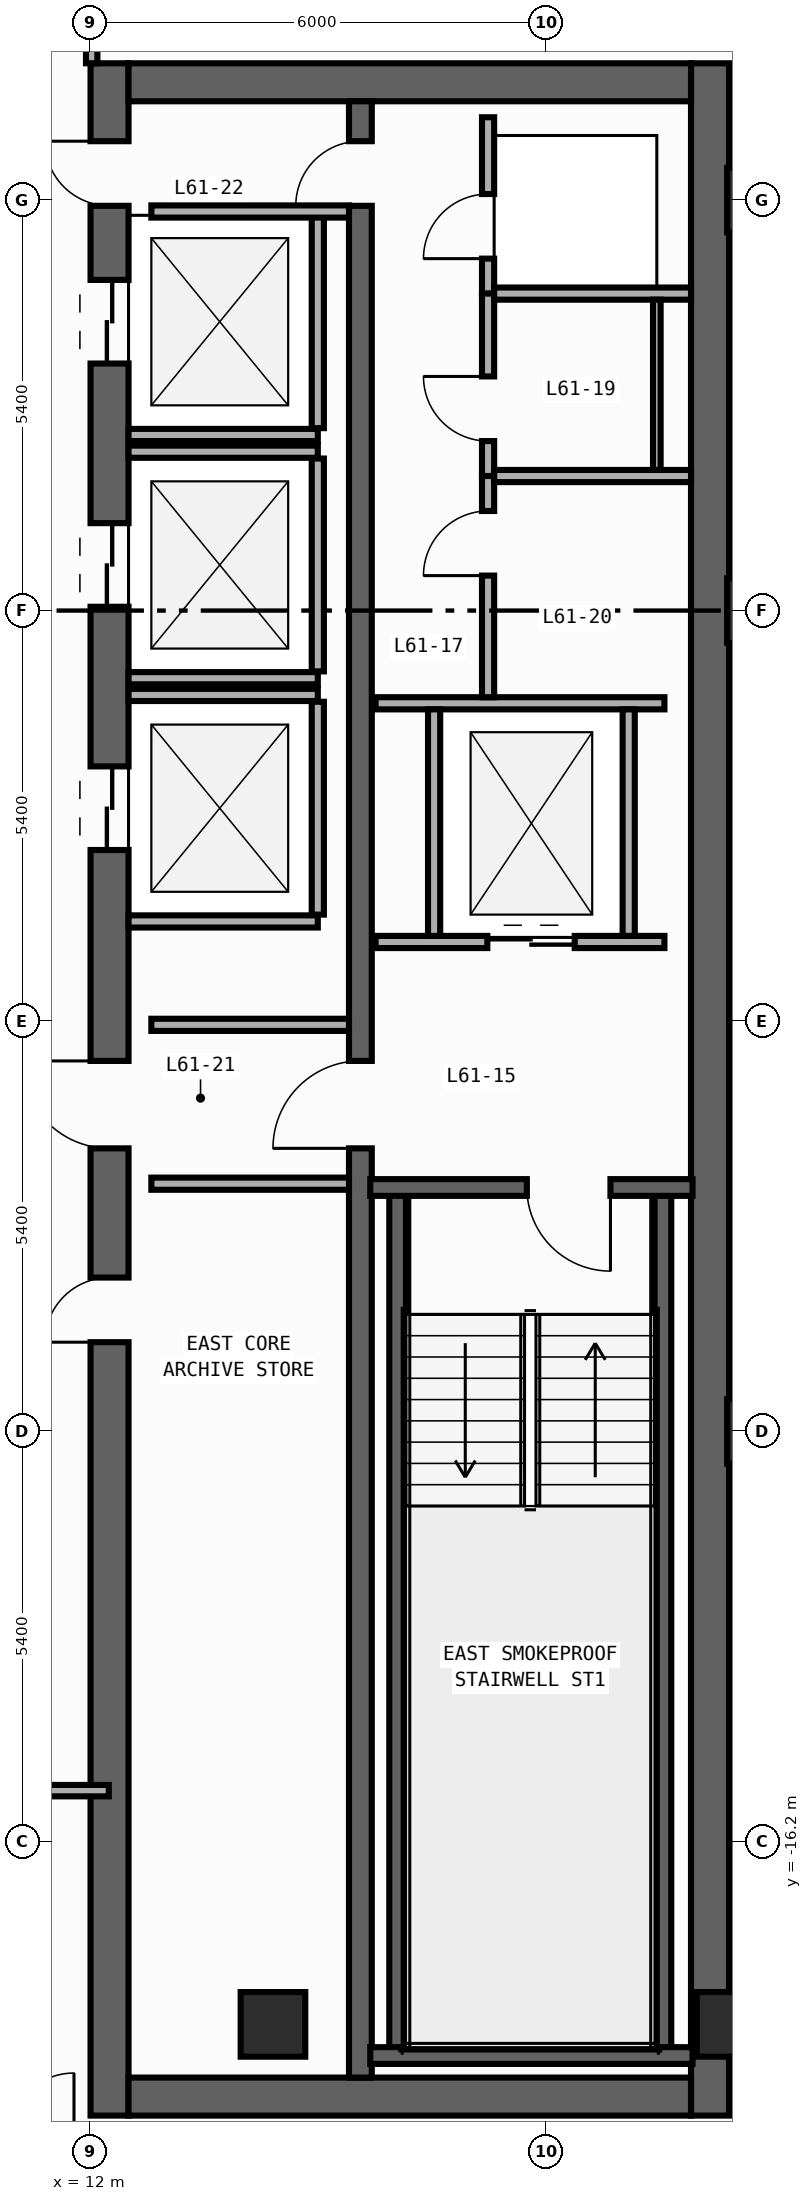
"""IFC4 building model, lengths in metres.
Left out: names, types, materials, properties, quantities, classifications, styles, units other than length and angle.
Written with IfcOpenShell. Run it as: python <this file> out.ifc"""

import sys

from ifc_helpers import new_model, si_unit, direction, frame, frame_2d, origin, origin_2d, place, context, subcontext, project, spatial, rectangle, extrude, element, fill, save


model = new_model("IFC4")
c1 = context("Model", 3, precision=1e-05, world=origin(), true_north=direction((0.0, 1.0)))
c2 = subcontext(c1, "Body", "Model", "MODEL_VIEW")
j1 = project(units=[si_unit("LENGTHUNIT", "METRE"), si_unit("PLANEANGLEUNIT", "RADIAN")], contexts=[c1])
p1 = place(None, origin())
s1 = spatial("IfcSite", under=j1, at=p1, CompositionType="ELEMENT")
p2 = place(p1, origin())
s2 = spatial("IfcBuilding", under=s1, at=p2, CompositionType="ELEMENT")
p3 = place(p2, frame((0.0, 0.0, 258.4)))
s3 = spatial("IfcBuildingStorey", under=s2, at=p3, CompositionType="ELEMENT", Elevation=258.4)
p4 = place(p3, frame((12.25, -19.8, 0.0), z_axis=(0.0, 0.0, 1.0), x_axis=(0.0, 1.0, 0.0)))
e1 = element("IfcWall", 1, at=p4, inside=s3, PredefinedType="SHEAR", context=c2, shape_type="SweptSolid", body=[
    extrude(rectangle(XDim=27.0, YDim=0.5, at=frame_2d((13.5, 0.0))), origin(), (0.0, 0.0, 1.0), 3.34),
])
p5 = place(p4, frame((23.05, 0.0, 0.0)))
e2 = element("IfcOpeningElement", 2, at=p5, cuts=e1, PredefinedType="OPENING", context=c2, shape_type="SweptSolid", body=[
    extrude(rectangle(XDim=1.1, YDim=2.2, at=frame_2d((0.55, 1.1))), frame((0.0, 0.26, 0.0), z_axis=(0.0, -1.0, 0.0), x_axis=(1.0, 0.0, 0.0)), (0.0, 0.0, 1.0), 0.52),
])
p6 = place(p4, frame((19.85, 0.0, 0.0)))
e3 = element("IfcOpeningElement", 3, at=p6, cuts=e1, PredefinedType="OPENING", context=c2, shape_type="SweptSolid", body=[
    extrude(rectangle(XDim=1.1, YDim=2.2, at=frame_2d((0.55, 1.1))), frame((0.0, 0.26, 0.0), z_axis=(0.0, -1.0, 0.0), x_axis=(1.0, 0.0, 0.0)), (0.0, 0.0, 1.0), 0.52),
])
p7 = place(p4, frame((16.65, 0.0, 0.0)))
e4 = element("IfcOpeningElement", 4, at=p7, cuts=e1, PredefinedType="OPENING", context=c2, shape_type="SweptSolid", body=[
    extrude(rectangle(XDim=1.1, YDim=2.2, at=frame_2d((0.55, 1.1))), frame((0.0, 0.26, 0.0), z_axis=(0.0, -1.0, 0.0), x_axis=(1.0, 0.0, 0.0)), (0.0, 0.0, 1.0), 0.52),
])
p8 = place(p4, frame((10.175, 0.0, 0.0)))
e5 = element("IfcOpeningElement", 5, at=p8, cuts=e1, PredefinedType="OPENING", context=c2, shape_type="SweptSolid", body=[
    extrude(rectangle(XDim=0.85, YDim=2.1, at=frame_2d((0.425, 1.05))), frame((0.0, 0.26, 0.0), z_axis=(0.0, -1.0, 0.0), x_axis=(1.0, 0.0, 0.0)), (0.0, 0.0, 1.0), 0.52),
])
p9 = place(p4, frame((12.725, 0.0, 0.0)))
e6 = element("IfcOpeningElement", 6, at=p9, cuts=e1, PredefinedType="OPENING", context=c2, shape_type="SweptSolid", body=[
    extrude(rectangle(XDim=1.15, YDim=2.2, at=frame_2d((0.575, 1.1))), frame((0.0, 0.26, 0.0), z_axis=(0.0, -1.0, 0.0), x_axis=(1.0, 0.0, 0.0)), (0.0, 0.0, 1.0), 0.52),
])
p10 = place(p4, frame((25.125, 0.0, 0.0)))
e7 = element("IfcOpeningElement", 7, at=p10, cuts=e1, PredefinedType="OPENING", context=c2, shape_type="SweptSolid", body=[
    extrude(rectangle(XDim=0.85, YDim=2.1, at=frame_2d((0.425, 1.05))), frame((0.0, 0.26, 0.0), z_axis=(0.0, -1.0, 0.0), x_axis=(1.0, 0.0, 0.0)), (0.0, 0.0, 1.0), 0.52),
])
p11 = place(p3, frame((20.15, -19.8, 0.0), z_axis=(0.0, 0.0, 1.0), x_axis=(0.0, 1.0, 0.0)))
e8 = element("IfcWall", 8, at=p11, inside=s3, PredefinedType="SHEAR", context=c2, shape_type="SweptSolid", body=[
    extrude(rectangle(XDim=27.0, YDim=0.5, at=frame_2d((13.5, 0.0))), origin(), (0.0, 0.0, 1.0), 3.34),
])
for number, where, z_axis, x_axis in (
    (9, (12.5, -19.55, 0.0), (0.0, 0.0, 1.0), (1.0, 0.0, 0.0)),
    (10, (12.5, 6.95, 0.0), (0.0, 0.0, 1.0), (1.0, 0.0, 0.0)),
):
    element("IfcWall", number, at=place(p3, frame(where, z_axis=z_axis, x_axis=x_axis)), inside=s3, PredefinedType="SHEAR", context=c2, shape_type="SweptSolid", body=[
        extrude(rectangle(XDim=7.4, YDim=0.5, at=frame_2d((3.7, 0.0))), origin(), (0.0, 0.0, 1.0), 3.34),
    ])
p12 = place(p3, frame((15.55, -19.3, 0.0), z_axis=(0.0, 0.0, 1.0), x_axis=(0.0, 1.0, 0.0)))
e11 = element("IfcWall", 11, at=p12, inside=s3, PredefinedType="SHEAR", context=c2, shape_type="SweptSolid", body=[
    extrude(rectangle(XDim=26.0, YDim=0.3, at=frame_2d((13.0, 0.0))), origin(), (0.0, 0.0, 1.0), 3.34),
])
p13 = place(p12, frame((12.225, 0.0, 0.0)))
e12 = element("IfcOpeningElement", 12, at=p13, cuts=e11, PredefinedType="OPENING", context=c2, shape_type="SweptSolid", body=[
    extrude(rectangle(XDim=1.15, YDim=2.2, at=frame_2d((0.575, 1.1))), frame((0.0, 0.16, 0.0), z_axis=(0.0, -1.0, 0.0), x_axis=(1.0, 0.0, 0.0)), (0.0, 0.0, 1.0), 0.32),
])
p14 = place(p12, frame((24.625, 0.0, 0.0)))
e13 = element("IfcOpeningElement", 13, at=p14, cuts=e11, PredefinedType="OPENING", context=c2, shape_type="SweptSolid", body=[
    extrude(rectangle(XDim=0.85, YDim=2.1, at=frame_2d((0.425, 1.05))), frame((0.0, 0.16, 0.0), z_axis=(0.0, -1.0, 0.0), x_axis=(1.0, 0.0, 0.0)), (0.0, 0.0, 1.0), 0.32),
])
for number, where, z_axis, x_axis in (
    (14, (16.04, -19.01, 0.0), (0.0, 0.0, 1.0), (0.0, 1.0, 0.0)),
    (15, (19.53, -19.01, 0.0), (0.0, 0.0, 1.0), (0.0, 1.0, 0.0)),
):
    element("IfcWall", number, at=place(p3, frame(where, z_axis=z_axis, x_axis=x_axis)), inside=s3, PredefinedType="SHEAR", context=c2, shape_type="SweptSolid", body=[
        extrude(rectangle(XDim=11.42, YDim=0.22, at=frame_2d((5.71, 0.0))), origin(), (0.0, 0.0, 1.0), 3.34),
    ])
p15 = place(p3, frame((15.68, -19.01, 0.0), z_axis=(0.0, 0.0, 1.0), x_axis=(1.0, 0.0, 0.0)))
e16 = element("IfcWall", 16, at=p15, inside=s3, PredefinedType="SHEAR", context=c2, shape_type="SweptSolid", body=[
    extrude(rectangle(XDim=4.24, YDim=0.22, at=frame_2d((2.12, 0.0))), origin(), (0.0, 0.0, 1.0), 3.34),
])
p16 = place(p3, frame((19.92, -7.59, 0.0), z_axis=(0.0, 0.0, 1.0), x_axis=(-1.0, 0.0, 0.0)))
e17 = element("IfcWall", 17, at=p16, inside=s3, PredefinedType="SHEAR", context=c2, shape_type="SweptSolid", body=[
    extrude(rectangle(XDim=4.24, YDim=0.22, at=frame_2d((2.12, 0.0))), origin(), (0.0, 0.0, 1.0), 3.34),
])
p17 = place(p16, frame((1.08, 0.0, 0.0)))
e18 = element("IfcOpeningElement", 18, at=p17, cuts=e17, PredefinedType="OPENING", context=c2, shape_type="SweptSolid", body=[
    extrude(rectangle(XDim=1.1, YDim=2.2, at=frame_2d((0.55, 1.1))), frame((0.0, 0.12, 0.0), z_axis=(0.0, -1.0, 0.0), x_axis=(1.0, 0.0, 0.0)), (0.0, 0.0, 1.0), 0.24),
])
for number, where, z_axis, x_axis in (
    (19, (20.4, -18.6, 0.0), (0.0, 0.0, 1.0), (1.0, 0.0, 0.0)),
    (20, (14.4, -18.6, 0.0), (0.0, 0.0, 1.0), (1.0, 0.0, 0.0)),
    (21, (20.8, -10.8, 0.0), (0.0, 0.0, 1.0), (1.0, 0.0, 0.0)),
    (22, (20.8, 0.0, 0.0), (0.0, 0.0, 1.0), (1.0, 0.0, 0.0)),
    (23, (20.8, 5.4, 0.0), (0.0, 0.0, 1.0), (1.0, 0.0, 0.0)),
):
    element("IfcColumn", number, at=place(p3, frame(where, z_axis=z_axis, x_axis=x_axis)), inside=s3, PredefinedType="COLUMN", context=c2, shape_type="SweptSolid", body=[
        extrude(rectangle(XDim=0.85, YDim=0.85, at=origin_2d()), origin(), (0.0, 0.0, 1.0), 3.6),
    ])
p18 = place(p3, frame((12.5, 2.31, 0.0), z_axis=(0.0, 0.0, 1.0), x_axis=(1.0, 0.0, 0.0)))
e24 = element("IfcWall", 24, at=p18, inside=s3, PredefinedType="STANDARD", context=c2, shape_type="SweptSolid", body=[
    extrude(rectangle(XDim=2.49, YDim=0.16, at=frame_2d((1.245, 0.0))), origin(), (0.0, 0.0, 1.0), 3.34),
])
p19 = place(p3, frame((14.99, 2.4, 0.0), z_axis=(0.0, 0.0, 1.0), x_axis=(0.0, 1.0, 0.0)))
e25 = element("IfcWall", 25, at=p19, inside=s3, PredefinedType="STANDARD", context=c2, shape_type="SweptSolid", body=[
    extrude(rectangle(XDim=2.8, YDim=0.16, at=frame_2d((1.4, 0.0))), origin(), (0.0, 0.0, 1.0), 3.34),
])
for number, where, z_axis, x_axis in (
    (26, (12.5, -0.89, 0.0), (0.0, 0.0, 1.0), (1.0, 0.0, 0.0)),
    (27, (12.5, 2.09, 0.0), (0.0, 0.0, 1.0), (1.0, 0.0, 0.0)),
):
    element("IfcWall", number, at=place(p3, frame(where, z_axis=z_axis, x_axis=x_axis)), inside=s3, PredefinedType="STANDARD", context=c2, shape_type="SweptSolid", body=[
        extrude(rectangle(XDim=2.49, YDim=0.16, at=frame_2d((1.245, 0.0))), origin(), (0.0, 0.0, 1.0), 3.34),
    ])
p20 = place(p3, frame((14.99, -0.8, 0.0), z_axis=(0.0, 0.0, 1.0), x_axis=(0.0, 1.0, 0.0)))
e28 = element("IfcWall", 28, at=p20, inside=s3, PredefinedType="STANDARD", context=c2, shape_type="SweptSolid", body=[
    extrude(rectangle(XDim=2.8, YDim=0.16, at=frame_2d((1.4, 0.0))), origin(), (0.0, 0.0, 1.0), 3.34),
])
for number, where, z_axis, x_axis in (
    (29, (12.5, -4.09, 0.0), (0.0, 0.0, 1.0), (1.0, 0.0, 0.0)),
    (30, (12.5, -1.11, 0.0), (0.0, 0.0, 1.0), (1.0, 0.0, 0.0)),
):
    element("IfcWall", number, at=place(p3, frame(where, z_axis=z_axis, x_axis=x_axis)), inside=s3, PredefinedType="STANDARD", context=c2, shape_type="SweptSolid", body=[
        extrude(rectangle(XDim=2.49, YDim=0.16, at=frame_2d((1.245, 0.0))), origin(), (0.0, 0.0, 1.0), 3.34),
    ])
p21 = place(p3, frame((14.99, -4.0, 0.0), z_axis=(0.0, 0.0, 1.0), x_axis=(0.0, 1.0, 0.0)))
e31 = element("IfcWall", 31, at=p21, inside=s3, PredefinedType="STANDARD", context=c2, shape_type="SweptSolid", body=[
    extrude(rectangle(XDim=2.8, YDim=0.16, at=frame_2d((1.4, 0.0))), origin(), (0.0, 0.0, 1.0), 3.34),
])
p22 = place(p3, frame((15.75, -4.36, 0.0), z_axis=(0.0, 0.0, 1.0), x_axis=(1.0, 0.0, 0.0)))
e32 = element("IfcWall", 32, at=p22, inside=s3, PredefinedType="STANDARD", context=c2, shape_type="SweptSolid", body=[
    extrude(rectangle(XDim=3.8, YDim=0.16, at=frame_2d((1.9, 0.0))), origin(), (0.0, 0.0, 1.0), 3.34),
])
p23 = place(p22, frame((1.47, 0.0, 0.0)))
e33 = element("IfcOpeningElement", 33, at=p23, cuts=e32, PredefinedType="OPENING", context=c2, shape_type="SweptSolid", body=[
    extrude(rectangle(XDim=1.15, YDim=2.2, at=frame_2d((0.575, 1.1))), frame((0.0, 0.09, 0.0), z_axis=(0.0, -1.0, 0.0), x_axis=(1.0, 0.0, 0.0)), (0.0, 0.0, 1.0), 0.18),
])
p24 = place(p3, frame((15.75, -1.22, 0.0), z_axis=(0.0, 0.0, 1.0), x_axis=(1.0, 0.0, 0.0)))
e34 = element("IfcWall", 34, at=p24, inside=s3, PredefinedType="STANDARD", context=c2, shape_type="SweptSolid", body=[
    extrude(rectangle(XDim=3.8, YDim=0.16, at=frame_2d((1.9, 0.0))), origin(), (0.0, 0.0, 1.0), 3.34),
])
for number, where, z_axis, x_axis in (
    (35, (16.52, -4.28, 0.0), (0.0, 0.0, 1.0), (0.0, 1.0, 0.0)),
    (36, (19.08, -4.28, 0.0), (0.0, 0.0, 1.0), (0.0, 1.0, 0.0)),
):
    element("IfcWall", number, at=place(p3, frame(where, z_axis=z_axis, x_axis=x_axis)), inside=s3, PredefinedType="STANDARD", context=c2, shape_type="SweptSolid", body=[
        extrude(rectangle(XDim=2.98, YDim=0.16, at=frame_2d((1.49, 0.0))), origin(), (0.0, 0.0, 1.0), 3.34),
    ])
for number, where, z_axis, x_axis in (
    (37, (12.8, -5.45, 0.0), (0.0, 0.0, 1.0), (1.0, 0.0, 0.0)),
    (38, (12.8, -7.54, 0.0), (0.0, 0.0, 1.0), (1.0, 0.0, 0.0)),
    (39, (12.8, 5.25, 0.0), (0.0, 0.0, 1.0), (1.0, 0.0, 0.0)),
):
    element("IfcWall", number, at=place(p3, frame(where, z_axis=z_axis, x_axis=x_axis)), inside=s3, PredefinedType="STANDARD", context=c2, shape_type="SweptSolid", body=[
        extrude(rectangle(XDim=2.6, YDim=0.16, at=frame_2d((1.3, 0.0))), origin(), (0.0, 0.0, 1.0), 3.34),
    ])
p25 = place(p3, frame((17.23, 4.17, 0.0), z_axis=(0.0, 0.0, 1.0), x_axis=(0.0, 1.0, 0.0)))
e40 = element("IfcWall", 40, at=p25, inside=s3, PredefinedType="PARTITIONING", context=c2, shape_type="SweptSolid", body=[
    extrude(rectangle(XDim=2.32, YDim=0.16, at=frame_2d((1.16, 0.0))), origin(), (0.0, 0.0, 1.0), 3.34),
])
p26 = place(p25, frame((0.46, 0.0, 0.0)))
e41 = element("IfcOpeningElement", 41, at=p26, cuts=e40, PredefinedType="OPENING", context=c2, shape_type="SweptSolid", body=[
    extrude(rectangle(XDim=0.85, YDim=2.1, at=frame_2d((0.425, 1.05))), frame((0.0, 0.09, 0.0), z_axis=(0.0, -1.0, 0.0), x_axis=(1.0, 0.0, 0.0)), (0.0, 0.0, 1.0), 0.18),
])
p27 = place(p3, frame((17.23, 1.77, 0.0), z_axis=(0.0, 0.0, 1.0), x_axis=(0.0, 1.0, 0.0)))
e42 = element("IfcWall", 42, at=p27, inside=s3, PredefinedType="PARTITIONING", context=c2, shape_type="SweptSolid", body=[
    extrude(rectangle(XDim=2.4, YDim=0.16, at=frame_2d((1.2, 0.0))), origin(), (0.0, 0.0, 1.0), 3.34),
])
p28 = place(p27, frame((0.46, 0.0, 0.0)))
e43 = element("IfcOpeningElement", 43, at=p28, cuts=e42, PredefinedType="OPENING", context=c2, shape_type="SweptSolid", body=[
    extrude(rectangle(XDim=0.85, YDim=2.1, at=frame_2d((0.425, 1.05))), frame((0.0, 0.09, 0.0), z_axis=(0.0, -1.0, 0.0), x_axis=(1.0, 0.0, 0.0)), (0.0, 0.0, 1.0), 0.18),
])
p29 = place(p3, frame((17.23, -1.14, 0.0), z_axis=(0.0, 0.0, 1.0), x_axis=(0.0, 1.0, 0.0)))
e44 = element("IfcWall", 44, at=p29, inside=s3, PredefinedType="PARTITIONING", context=c2, shape_type="SweptSolid", body=[
    extrude(rectangle(XDim=2.91, YDim=0.16, at=frame_2d((1.455, 0.0))), origin(), (0.0, 0.0, 1.0), 3.34),
])
p30 = place(p29, frame((1.6, 0.0, 0.0)))
e45 = element("IfcOpeningElement", 45, at=p30, cuts=e44, PredefinedType="OPENING", context=c2, shape_type="SweptSolid", body=[
    extrude(rectangle(XDim=0.85, YDim=2.1, at=frame_2d((0.425, 1.05))), frame((0.0, 0.09, 0.0), z_axis=(0.0, -1.0, 0.0), x_axis=(1.0, 0.0, 0.0)), (0.0, 0.0, 1.0), 0.18),
])
for number, where, z_axis, x_axis in (
    (46, (17.31, 4.17, 0.0), (0.0, 0.0, 1.0), (1.0, 0.0, 0.0)),
    (47, (17.31, 1.77, 0.0), (0.0, 0.0, 1.0), (1.0, 0.0, 0.0)),
):
    element("IfcWall", number, at=place(p3, frame(where, z_axis=z_axis, x_axis=x_axis)), inside=s3, PredefinedType="PARTITIONING", context=c2, shape_type="SweptSolid", body=[
        extrude(rectangle(XDim=2.59, YDim=0.16, at=frame_2d((1.295, 0.0))), origin(), (0.0, 0.0, 1.0), 3.34),
    ])
p31 = place(p3, frame((12.015, 7.2, 0.0), z_axis=(0.0, 0.0, 1.0), x_axis=(0.0, 1.0, 0.0)))
e48 = element("IfcWall", 48, at=p31, inside=s3, PredefinedType="PARTITIONING", context=c2, shape_type="SweptSolid", body=[
    extrude(rectangle(XDim=6.52, YDim=0.15, at=frame_2d((3.26, 0.0))), origin(), (0.0, 0.0, 1.0), 3.34),
])
p32 = place(p31, frame((0.67, 0.0, 0.0)))
e49 = element("IfcOpeningElement", 49, at=p32, cuts=e48, PredefinedType="OPENING", context=c2, shape_type="SweptSolid", body=[
    extrude(rectangle(XDim=0.9, YDim=2.15, at=frame_2d((0.45, 1.075))), frame((0.0, 0.085, 0.0), z_axis=(0.0, -1.0, 0.0), x_axis=(1.0, 0.0, 0.0)), (0.0, 0.0, 1.0), 0.17),
])
p33 = place(p3, frame((2.89, -15.525, 0.0), z_axis=(0.0, 0.0, 1.0), x_axis=(1.0, 0.0, 0.0)))
e50 = element("IfcWall", 50, at=p33, inside=s3, PredefinedType="PARTITIONING", context=c2, shape_type="SweptSolid", body=[
    extrude(rectangle(XDim=9.35, YDim=0.15, at=frame_2d((4.675, 0.0))), origin(), (0.0, 0.0, 1.0), 3.34),
])
p34 = place(p33, frame((3.716, 0.0, 0.0)))
e51 = element("IfcOpeningElement", 51, at=p34, cuts=e50, PredefinedType="OPENING", context=c2, shape_type="SweptSolid", body=[
    extrude(rectangle(XDim=0.9, YDim=2.15, at=frame_2d((0.45, 1.075))), frame((0.0, 0.085, 0.0), z_axis=(0.0, -1.0, 0.0), x_axis=(1.0, 0.0, 0.0)), (0.0, 0.0, 1.0), 0.17),
])
p35 = place(p3, frame((19.45, 4.09, 0.0), z_axis=(0.0, 0.0, 1.0), x_axis=(0.0, -1.0, 0.0)))
e52 = element("IfcWall", 52, at=p35, inside=s3, PredefinedType="PARTITIONING", context=c2, shape_type="SweptSolid", body=[
    extrude(rectangle(XDim=2.24, YDim=0.1, at=frame_2d((1.12, 0.0))), origin(), (0.0, 0.0, 1.0), 3.34),
])
p36 = place(p17, origin())
e53 = element("IfcDoor", 53, at=p36, inside=s3, OperationType="SINGLE_SWING_LEFT", PredefinedType="DOOR", context=c2, shape_type="SweptSolid", body=[
    extrude(rectangle(XDim=1.1, YDim=2.2, at=frame_2d((0.55, 1.1))), frame((0.0, 0.025, 0.0), z_axis=(0.0, -1.0, 0.0), x_axis=(1.0, 0.0, 0.0)), (0.0, 0.0, 1.0), 0.05),
])
fill(e18, e53)
p37 = place(p5, origin())
e54 = element("IfcDoor", 54, at=p37, inside=s3, OperationType="DOUBLE_DOOR_SLIDING", PredefinedType="DOOR", context=c2, shape_type="SweptSolid", body=[
    extrude(rectangle(XDim=1.1, YDim=2.2, at=frame_2d((0.55, 1.1))), frame((0.0, 0.025, 0.0), z_axis=(0.0, -1.0, 0.0), x_axis=(1.0, 0.0, 0.0)), (0.0, 0.0, 1.0), 0.05),
])
fill(e2, e54)
p38 = place(p6, origin())
e55 = element("IfcDoor", 55, at=p38, inside=s3, OperationType="DOUBLE_DOOR_SLIDING", PredefinedType="DOOR", context=c2, shape_type="SweptSolid", body=[
    extrude(rectangle(XDim=1.1, YDim=2.2, at=frame_2d((0.55, 1.1))), frame((0.0, 0.025, 0.0), z_axis=(0.0, -1.0, 0.0), x_axis=(1.0, 0.0, 0.0)), (0.0, 0.0, 1.0), 0.05),
])
fill(e3, e55)
p39 = place(p7, origin())
e56 = element("IfcDoor", 56, at=p39, inside=s3, OperationType="DOUBLE_DOOR_SLIDING", PredefinedType="DOOR", context=c2, shape_type="SweptSolid", body=[
    extrude(rectangle(XDim=1.1, YDim=2.2, at=frame_2d((0.55, 1.1))), frame((0.0, 0.025, 0.0), z_axis=(0.0, -1.0, 0.0), x_axis=(1.0, 0.0, 0.0)), (0.0, 0.0, 1.0), 0.05),
])
fill(e4, e56)
p40 = place(p8, origin())
e57 = element("IfcDoor", 57, at=p40, inside=s3, OperationType="SINGLE_SWING_LEFT", PredefinedType="DOOR", context=c2, shape_type="SweptSolid", body=[
    extrude(rectangle(XDim=0.85, YDim=2.1, at=frame_2d((0.425, 1.05))), frame((0.0, 0.025, 0.0), z_axis=(0.0, -1.0, 0.0), x_axis=(1.0, 0.0, 0.0)), (0.0, 0.0, 1.0), 0.05),
])
fill(e5, e57)
p41 = place(p9, origin())
e58 = element("IfcDoor", 58, at=p41, inside=s3, OperationType="SINGLE_SWING_RIGHT", PredefinedType="DOOR", context=c2, shape_type="SweptSolid", body=[
    extrude(rectangle(XDim=1.15, YDim=2.2, at=frame_2d((0.575, 1.1))), frame((0.0, 0.025, 0.0), z_axis=(0.0, -1.0, 0.0), x_axis=(1.0, 0.0, 0.0)), (0.0, 0.0, 1.0), 0.05),
])
fill(e6, e58)
p42 = place(p13, origin())
e59 = element("IfcDoor", 59, at=p42, inside=s3, OperationType="SINGLE_SWING_LEFT", PredefinedType="DOOR", context=c2, shape_type="SweptSolid", body=[
    extrude(rectangle(XDim=1.15, YDim=2.2, at=frame_2d((0.575, 1.1))), frame((0.0, 0.025, 0.0), z_axis=(0.0, -1.0, 0.0), x_axis=(1.0, 0.0, 0.0)), (0.0, 0.0, 1.0), 0.05),
])
fill(e12, e59)
p43 = place(p10, origin())
e60 = element("IfcDoor", 60, at=p43, inside=s3, OperationType="SINGLE_SWING_RIGHT", PredefinedType="DOOR", context=c2, shape_type="SweptSolid", body=[
    extrude(rectangle(XDim=0.85, YDim=2.1, at=frame_2d((0.425, 1.05))), frame((0.0, 0.025, 0.0), z_axis=(0.0, -1.0, 0.0), x_axis=(1.0, 0.0, 0.0)), (0.0, 0.0, 1.0), 0.05),
])
fill(e7, e60)
p44 = place(p14, origin())
e61 = element("IfcDoor", 61, at=p44, inside=s3, OperationType="SINGLE_SWING_LEFT", PredefinedType="DOOR", context=c2, shape_type="SweptSolid", body=[
    extrude(rectangle(XDim=0.85, YDim=2.1, at=frame_2d((0.425, 1.05))), frame((0.0, 0.025, 0.0), z_axis=(0.0, -1.0, 0.0), x_axis=(1.0, 0.0, 0.0)), (0.0, 0.0, 1.0), 0.05),
])
fill(e13, e61)
p45 = place(p23, origin())
e62 = element("IfcDoor", 62, at=p45, inside=s3, OperationType="DOUBLE_DOOR_SLIDING", PredefinedType="DOOR", context=c2, shape_type="SweptSolid", body=[
    extrude(rectangle(XDim=1.15, YDim=2.2, at=frame_2d((0.575, 1.1))), frame((0.0, 0.025, 0.0), z_axis=(0.0, -1.0, 0.0), x_axis=(1.0, 0.0, 0.0)), (0.0, 0.0, 1.0), 0.05),
])
fill(e33, e62)
p46 = place(p26, origin())
e63 = element("IfcDoor", 63, at=p46, inside=s3, OperationType="SINGLE_SWING_LEFT", PredefinedType="DOOR", context=c2, shape_type="SweptSolid", body=[
    extrude(rectangle(XDim=0.85, YDim=2.1, at=frame_2d((0.425, 1.05))), frame((0.0, 0.025, 0.0), z_axis=(0.0, -1.0, 0.0), x_axis=(1.0, 0.0, 0.0)), (0.0, 0.0, 1.0), 0.05),
])
fill(e41, e63)
p47 = place(p28, origin())
e64 = element("IfcDoor", 64, at=p47, inside=s3, OperationType="SINGLE_SWING_RIGHT", PredefinedType="DOOR", context=c2, shape_type="SweptSolid", body=[
    extrude(rectangle(XDim=0.85, YDim=2.1, at=frame_2d((0.425, 1.05))), frame((0.0, 0.025, 0.0), z_axis=(0.0, -1.0, 0.0), x_axis=(1.0, 0.0, 0.0)), (0.0, 0.0, 1.0), 0.05),
])
fill(e43, e64)
p48 = place(p30, origin())
e65 = element("IfcDoor", 65, at=p48, inside=s3, OperationType="SINGLE_SWING_LEFT", PredefinedType="DOOR", context=c2, shape_type="SweptSolid", body=[
    extrude(rectangle(XDim=0.85, YDim=2.1, at=frame_2d((0.425, 1.05))), frame((0.0, 0.025, 0.0), z_axis=(0.0, -1.0, 0.0), x_axis=(1.0, 0.0, 0.0)), (0.0, 0.0, 1.0), 0.05),
])
fill(e45, e65)
save(model, sys.argv[1])
